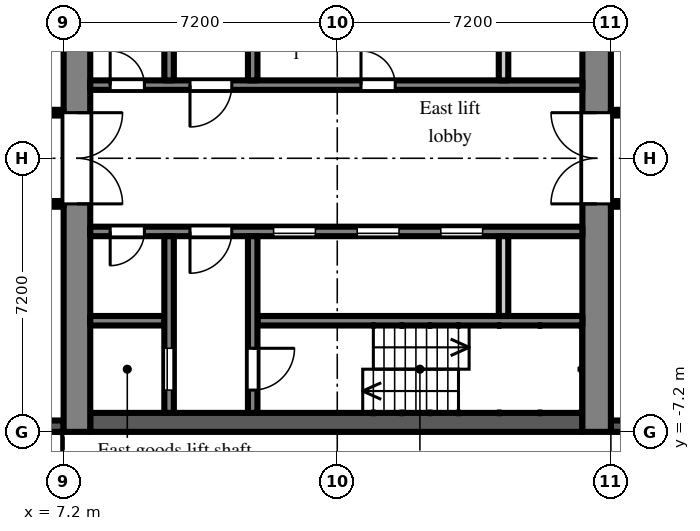
"""IFC4 building model, lengths in metres.
Left out: names, types, materials, properties, quantities, classifications, styles, units other than length and angle.
Written with IfcOpenShell. Run it as: python <this file> out.ifc"""

import sys

from ifc_helpers import new_model, si_unit, direction, frame, frame_2d, origin, place, context, subcontext, project, spatial, rectangle, extrude, element, fill, save


model = new_model("IFC4")
c1 = context("Model", 3, precision=1e-05, world=origin(), true_north=direction((0.0, 1.0)))
c2 = subcontext(c1, "Body", "Model", "MODEL_VIEW")
j1 = project(units=[si_unit("LENGTHUNIT", "METRE"), si_unit("PLANEANGLEUNIT", "RADIAN")], contexts=[c1])
p1 = place(None, origin())
s1 = spatial("IfcSite", under=j1, at=p1, CompositionType="ELEMENT")
p2 = place(p1, origin())
s2 = spatial("IfcBuilding", under=s1, at=p2, CompositionType="ELEMENT")
p3 = place(p2, frame((0.0, 0.0, 93.9)))
s3 = spatial("IfcBuildingStorey", under=s2, at=p3, CompositionType="ELEMENT", Elevation=93.9)
p4 = place(p3, frame((21.6, -7.05, 0.0), z_axis=(0.0, 0.0, 1.0), x_axis=(1.0, 0.0, 0.0)))
e1 = element("IfcWall", 1, at=p4, inside=s3, PredefinedType="SOLIDWALL", context=c2, shape_type="SweptSolid", body=[
    extrude(rectangle(XDim=2.7, YDim=0.3, at=frame_2d((1.35, 0.0))), origin(), (0.0, 0.0, 1.0), 2.1),
])
p5 = place(p3, frame((4.2, -7.05, 0.0), z_axis=(0.0, 0.0, 1.0), x_axis=(1.0, 0.0, 0.0)))
e2 = element("IfcWall", 2, at=p5, inside=s3, PredefinedType="SOLIDWALL", context=c2, shape_type="SweptSolid", body=[
    extrude(rectangle(XDim=3.0, YDim=0.3, at=frame_2d((1.5, 0.0))), origin(), (0.0, 0.0, 1.0), 2.1),
])
p6 = place(p3, frame((7.55, -7.2, 0.0), z_axis=(0.0, 0.0, 1.0), x_axis=(0.0, 1.0, 0.0)))
e3 = element("IfcWall", 3, at=p6, inside=s3, PredefinedType="SHEAR", context=c2, shape_type="SweptSolid", body=[
    extrude(rectangle(XDim=14.4, YDim=0.7, at=frame_2d((7.2, 0.0))), origin(), (0.0, 0.0, 1.0), 2.575),
])
p7 = place(p6, frame((6.0, 0.0, 0.0)))
e4 = element("IfcOpeningElement", 4, at=p7, cuts=e3, PredefinedType="OPENING", context=c2, shape_type="SweptSolid", body=[
    extrude(rectangle(XDim=2.4, YDim=2.2, at=frame_2d((1.2, 1.1))), frame((0.0, 0.36, 0.0), z_axis=(0.0, -1.0, 0.0), x_axis=(1.0, 0.0, 0.0)), (0.0, 0.0, 1.0), 0.72),
])
p8 = place(p3, frame((21.225, -7.2, 0.0), z_axis=(0.0, 0.0, 1.0), x_axis=(0.0, 1.0, 0.0)))
e5 = element("IfcWall", 5, at=p8, inside=s3, PredefinedType="SHEAR", context=c2, shape_type="SweptSolid", body=[
    extrude(rectangle(XDim=14.4, YDim=0.75, at=frame_2d((7.2, 0.0))), origin(), (0.0, 0.0, 1.0), 2.575),
])
p9 = place(p8, frame((6.0, 0.0, 0.0)))
e6 = element("IfcOpeningElement", 6, at=p9, cuts=e5, PredefinedType="OPENING", context=c2, shape_type="SweptSolid", body=[
    extrude(rectangle(XDim=2.4, YDim=2.2, at=frame_2d((1.2, 1.1))), frame((0.0, 0.385, 0.0), z_axis=(0.0, -1.0, 0.0), x_axis=(1.0, 0.0, 0.0)), (0.0, 0.0, 1.0), 0.77),
])
p10 = place(p3, frame((7.9, 1.925, 0.0), z_axis=(0.0, 0.0, 1.0), x_axis=(1.0, 0.0, 0.0)))
e7 = element("IfcWall", 7, at=p10, inside=s3, PredefinedType="SHEAR", context=c2, shape_type="SweptSolid", body=[
    extrude(rectangle(XDim=12.95, YDim=0.25, at=frame_2d((6.475, 0.0))), origin(), (0.0, 0.0, 1.0), 2.575),
])
p11 = place(p10, frame((0.525, 0.0, 0.0)))
e8 = element("IfcOpeningElement", 8, at=p11, cuts=e7, PredefinedType="OPENING", context=c2, shape_type="SweptSolid", body=[
    extrude(rectangle(XDim=0.9, YDim=2.1, at=frame_2d((0.45, 1.05))), frame((0.0, 0.135, 0.0), z_axis=(0.0, -1.0, 0.0), x_axis=(1.0, 0.0, 0.0)), (0.0, 0.0, 1.0), 0.27),
])
p12 = place(p10, frame((2.625, 0.0, 0.0)))
e9 = element("IfcOpeningElement", 9, at=p12, cuts=e7, PredefinedType="OPENING", context=c2, shape_type="SweptSolid", body=[
    extrude(rectangle(XDim=1.1, YDim=2.1, at=frame_2d((0.55, 1.05))), frame((0.0, 0.135, 0.0), z_axis=(0.0, -1.0, 0.0), x_axis=(1.0, 0.0, 0.0)), (0.0, 0.0, 1.0), 0.27),
])
p13 = place(p10, frame((7.125, 0.0, 0.0)))
e10 = element("IfcOpeningElement", 10, at=p13, cuts=e7, PredefinedType="OPENING", context=c2, shape_type="SweptSolid", body=[
    extrude(rectangle(XDim=0.9, YDim=2.1, at=frame_2d((0.45, 1.05))), frame((0.0, 0.135, 0.0), z_axis=(0.0, -1.0, 0.0), x_axis=(1.0, 0.0, 0.0)), (0.0, 0.0, 1.0), 0.27),
])
p14 = place(p3, frame((9.975, 2.05, 0.0), z_axis=(0.0, 0.0, 1.0), x_axis=(0.0, 1.0, 0.0)))
e11 = element("IfcWall", 11, at=p14, inside=s3, PredefinedType="SHEAR", context=c2, shape_type="SweptSolid", body=[
    extrude(rectangle(XDim=4.65, YDim=0.25, at=frame_2d((2.325, 0.0))), origin(), (0.0, 0.0, 1.0), 2.575),
])
p15 = place(p14, frame((2.95, 0.0, 0.0)))
e12 = element("IfcOpeningElement", 12, at=p15, cuts=e11, PredefinedType="OPENING", context=c2, shape_type="SweptSolid", body=[
    extrude(rectangle(XDim=1.1, YDim=2.1, at=frame_2d((0.55, 1.05))), frame((0.0, 0.135, 0.0), z_axis=(0.0, -1.0, 0.0), x_axis=(1.0, 0.0, 0.0)), (0.0, 0.0, 1.0), 0.27),
])
p16 = place(p3, frame((12.175, 2.05, 0.0), z_axis=(0.0, 0.0, 1.0), x_axis=(0.0, 1.0, 0.0)))
e13 = element("IfcWall", 13, at=p16, inside=s3, PredefinedType="SHEAR", context=c2, shape_type="SweptSolid", body=[
    extrude(rectangle(XDim=4.65, YDim=0.25, at=frame_2d((2.325, 0.0))), origin(), (0.0, 0.0, 1.0), 2.575),
])
p17 = place(p16, frame((2.95, 0.0, 0.0)))
e14 = element("IfcOpeningElement", 14, at=p17, cuts=e13, PredefinedType="OPENING", context=c2, shape_type="SweptSolid", body=[
    extrude(rectangle(XDim=1.1, YDim=2.1, at=frame_2d((0.55, 1.05))), frame((0.0, 0.135, 0.0), z_axis=(0.0, -1.0, 0.0), x_axis=(1.0, 0.0, 0.0)), (0.0, 0.0, 1.0), 0.27),
])
p18 = place(p3, frame((18.775, 2.05, 0.0), z_axis=(0.0, 0.0, 1.0), x_axis=(0.0, 1.0, 0.0)))
e15 = element("IfcWall", 15, at=p18, inside=s3, PredefinedType="PARTITIONING", context=c2, shape_type="SweptSolid", body=[
    extrude(rectangle(XDim=2.1, YDim=0.25, at=frame_2d((1.05, 0.0))), origin(), (0.0, 0.0, 1.0), 2.575),
])
p19 = place(p3, frame((7.9, -6.95, 0.0), z_axis=(0.0, 0.0, 1.0), x_axis=(1.0, 0.0, 0.0)))
e16 = element("IfcWall", 16, at=p19, inside=s3, PredefinedType="SHEAR", context=c2, shape_type="SweptSolid", body=[
    extrude(rectangle(XDim=12.95, YDim=0.5, at=frame_2d((6.475, 0.0))), origin(), (0.0, 0.0, 1.0), 2.575),
])
p20 = place(p3, frame((7.9, -1.925, 0.0), z_axis=(0.0, 0.0, 1.0), x_axis=(1.0, 0.0, 0.0)))
e17 = element("IfcWall", 17, at=p20, inside=s3, PredefinedType="SHEAR", context=c2, shape_type="SweptSolid", body=[
    extrude(rectangle(XDim=12.95, YDim=0.25, at=frame_2d((6.475, 0.0))), origin(), (0.0, 0.0, 1.0), 2.575),
])
p21 = place(p20, frame((4.825, 0.0, 0.0)))
e18 = element("IfcOpeningElement", 18, at=p21, cuts=e17, PredefinedType="OPENING", context=c2, shape_type="SweptSolid", body=[
    extrude(rectangle(XDim=1.1, YDim=2.1, at=frame_2d((0.55, 1.05))), frame((0.0, 0.135, 0.0), z_axis=(0.0, -1.0, 0.0), x_axis=(1.0, 0.0, 0.0)), (0.0, 0.0, 1.0), 0.27),
])
p22 = place(p20, frame((7.025, 0.0, 0.0)))
e19 = element("IfcOpeningElement", 19, at=p22, cuts=e17, PredefinedType="OPENING", context=c2, shape_type="SweptSolid", body=[
    extrude(rectangle(XDim=1.1, YDim=2.1, at=frame_2d((0.55, 1.05))), frame((0.0, 0.135, 0.0), z_axis=(0.0, -1.0, 0.0), x_axis=(1.0, 0.0, 0.0)), (0.0, 0.0, 1.0), 0.27),
])
p23 = place(p20, frame((9.225, 0.0, 0.0)))
e20 = element("IfcOpeningElement", 20, at=p23, cuts=e17, PredefinedType="OPENING", context=c2, shape_type="SweptSolid", body=[
    extrude(rectangle(XDim=1.1, YDim=2.1, at=frame_2d((0.55, 1.05))), frame((0.0, 0.135, 0.0), z_axis=(0.0, -1.0, 0.0), x_axis=(1.0, 0.0, 0.0)), (0.0, 0.0, 1.0), 0.27),
])
p24 = place(p20, frame((0.525, 0.0, 0.0)))
e21 = element("IfcOpeningElement", 21, at=p24, cuts=e17, PredefinedType="OPENING", context=c2, shape_type="SweptSolid", body=[
    extrude(rectangle(XDim=0.9, YDim=2.1, at=frame_2d((0.45, 1.05))), frame((0.0, 0.135, 0.0), z_axis=(0.0, -1.0, 0.0), x_axis=(1.0, 0.0, 0.0)), (0.0, 0.0, 1.0), 0.27),
])
p25 = place(p20, frame((2.625, 0.0, 0.0)))
e22 = element("IfcOpeningElement", 22, at=p25, cuts=e17, PredefinedType="OPENING", context=c2, shape_type="SweptSolid", body=[
    extrude(rectangle(XDim=1.1, YDim=2.1, at=frame_2d((0.55, 1.05))), frame((0.0, 0.135, 0.0), z_axis=(0.0, -1.0, 0.0), x_axis=(1.0, 0.0, 0.0)), (0.0, 0.0, 1.0), 0.27),
])
p26 = place(p3, frame((7.9, -4.275, 0.0), z_axis=(0.0, 0.0, 1.0), x_axis=(1.0, 0.0, 0.0)))
e23 = element("IfcWall", 23, at=p26, inside=s3, PredefinedType="SHEAR", context=c2, shape_type="SweptSolid", body=[
    extrude(rectangle(XDim=1.95, YDim=0.25, at=frame_2d((0.975, 0.0))), origin(), (0.0, 0.0, 1.0), 2.575),
])
p27 = place(p3, frame((12.3, -4.275, 0.0), z_axis=(0.0, 0.0, 1.0), x_axis=(1.0, 0.0, 0.0)))
e24 = element("IfcWall", 24, at=p27, inside=s3, PredefinedType="SHEAR", context=c2, shape_type="SweptSolid", body=[
    extrude(rectangle(XDim=8.55, YDim=0.25, at=frame_2d((4.275, 0.0))), origin(), (0.0, 0.0, 1.0), 2.575),
])
p28 = place(p3, frame((9.975, -2.05, 0.0), z_axis=(0.0, 0.0, 1.0), x_axis=(0.0, -1.0, 0.0)))
e25 = element("IfcWall", 25, at=p28, inside=s3, PredefinedType="SHEAR", context=c2, shape_type="SweptSolid", body=[
    extrude(rectangle(XDim=4.65, YDim=0.25, at=frame_2d((2.325, 0.0))), origin(), (0.0, 0.0, 1.0), 2.575),
])
p29 = place(p28, frame((2.95, 0.0, 0.0)))
e26 = element("IfcOpeningElement", 26, at=p29, cuts=e25, PredefinedType="OPENING", context=c2, shape_type="SweptSolid", body=[
    extrude(rectangle(XDim=1.1, YDim=2.1, at=frame_2d((0.55, 1.05))), frame((0.0, 0.135, 0.0), z_axis=(0.0, -1.0, 0.0), x_axis=(1.0, 0.0, 0.0)), (0.0, 0.0, 1.0), 0.27),
])
p30 = place(p3, frame((12.175, -2.05, 0.0), z_axis=(0.0, 0.0, 1.0), x_axis=(0.0, -1.0, 0.0)))
e27 = element("IfcWall", 27, at=p30, inside=s3, PredefinedType="SHEAR", context=c2, shape_type="SweptSolid", body=[
    extrude(rectangle(XDim=4.65, YDim=0.25, at=frame_2d((2.325, 0.0))), origin(), (0.0, 0.0, 1.0), 2.575),
])
p31 = place(p30, frame((2.95, 0.0, 0.0)))
e28 = element("IfcOpeningElement", 28, at=p31, cuts=e27, PredefinedType="OPENING", context=c2, shape_type="SweptSolid", body=[
    extrude(rectangle(XDim=1.1, YDim=2.1, at=frame_2d((0.55, 1.05))), frame((0.0, 0.135, 0.0), z_axis=(0.0, -1.0, 0.0), x_axis=(1.0, 0.0, 0.0)), (0.0, 0.0, 1.0), 0.27),
])
p32 = place(p3, frame((18.775, -2.05, 0.0), z_axis=(0.0, 0.0, 1.0), x_axis=(0.0, -1.0, 0.0)))
e29 = element("IfcWall", 29, at=p32, inside=s3, PredefinedType="PARTITIONING", context=c2, shape_type="SweptSolid", body=[
    extrude(rectangle(XDim=2.1, YDim=0.25, at=frame_2d((1.05, 0.0))), origin(), (0.0, 0.0, 1.0), 2.575),
])
p33 = place(p3, frame((1.275, -1.2, 0.0), z_axis=(0.0, 0.0, 1.0), x_axis=(1.0, 0.0, 0.0)))
e30 = element("IfcWall", 30, at=p33, inside=s3, PredefinedType="PARTITIONING", context=c2, shape_type="SweptSolid", body=[
    extrude(rectangle(XDim=5.925, YDim=0.15, at=frame_2d((2.962, 0.0))), origin(), (0.0, 0.0, 1.0), 2.575),
])
p34 = place(p33, frame((3.075, 0.0, 0.0)))
e31 = element("IfcOpeningElement", 31, at=p34, cuts=e30, PredefinedType="OPENING", context=c2, shape_type="SweptSolid", body=[
    extrude(rectangle(XDim=0.9, YDim=2.1, at=frame_2d((0.45, 1.05))), frame((0.0, 0.085, 0.0), z_axis=(0.0, -1.0, 0.0), x_axis=(1.0, 0.0, 0.0)), (0.0, 0.0, 1.0), 0.17),
])
p35 = place(p3, frame((1.275, 1.2, 0.0), z_axis=(0.0, 0.0, 1.0), x_axis=(1.0, 0.0, 0.0)))
e32 = element("IfcWall", 32, at=p35, inside=s3, PredefinedType="PARTITIONING", context=c2, shape_type="SweptSolid", body=[
    extrude(rectangle(XDim=5.925, YDim=0.15, at=frame_2d((2.962, 0.0))), origin(), (0.0, 0.0, 1.0), 2.575),
])
p36 = place(p35, frame((2.475, 0.0, 0.0)))
e33 = element("IfcOpeningElement", 33, at=p36, cuts=e32, PredefinedType="OPENING", context=c2, shape_type="SweptSolid", body=[
    extrude(rectangle(XDim=0.9, YDim=2.1, at=frame_2d((0.45, 1.05))), frame((0.0, 0.085, 0.0), z_axis=(0.0, -1.0, 0.0), x_axis=(1.0, 0.0, 0.0)), (0.0, 0.0, 1.0), 0.17),
])
p37 = place(p35, frame((4.475, 0.0, 0.0)))
e34 = element("IfcOpeningElement", 34, at=p37, cuts=e32, PredefinedType="OPENING", context=c2, shape_type="SweptSolid", body=[
    extrude(rectangle(XDim=0.9, YDim=2.1, at=frame_2d((0.45, 1.05))), frame((0.0, 0.085, 0.0), z_axis=(0.0, -1.0, 0.0), x_axis=(1.0, 0.0, 0.0)), (0.0, 0.0, 1.0), 0.17),
])
p38 = place(p3, frame((21.6, -1.2, 0.0), z_axis=(0.0, 0.0, 1.0), x_axis=(1.0, 0.0, 0.0)))
e35 = element("IfcWall", 35, at=p38, inside=s3, PredefinedType="PARTITIONING", context=c2, shape_type="SweptSolid", body=[
    extrude(rectangle(XDim=14.9, YDim=0.15, at=frame_2d((7.45, 0.0))), origin(), (0.0, 0.0, 1.0), 2.575),
])
p39 = place(p38, frame((2.7, 0.0, 0.0)))
e36 = element("IfcOpeningElement", 36, at=p39, cuts=e35, PredefinedType="OPENING", context=c2, shape_type="SweptSolid", body=[
    extrude(rectangle(XDim=1.8, YDim=2.1, at=frame_2d((0.9, 1.05))), frame((0.0, 0.085, 0.0), z_axis=(0.0, -1.0, 0.0), x_axis=(1.0, 0.0, 0.0)), (0.0, 0.0, 1.0), 0.17),
])
p40 = place(p38, frame((9.2, 0.0, 0.0)))
e37 = element("IfcOpeningElement", 37, at=p40, cuts=e35, PredefinedType="OPENING", context=c2, shape_type="SweptSolid", body=[
    extrude(rectangle(XDim=1.0, YDim=2.1, at=frame_2d((0.5, 1.05))), frame((0.0, 0.085, 0.0), z_axis=(0.0, -1.0, 0.0), x_axis=(1.0, 0.0, 0.0)), (0.0, 0.0, 1.0), 0.17),
])
p41 = place(p38, frame((11.95, 0.0, 0.0)))
e38 = element("IfcOpeningElement", 38, at=p41, cuts=e35, PredefinedType="OPENING", context=c2, shape_type="SweptSolid", body=[
    extrude(rectangle(XDim=1.8, YDim=2.1, at=frame_2d((0.9, 1.05))), frame((0.0, 0.085, 0.0), z_axis=(0.0, -1.0, 0.0), x_axis=(1.0, 0.0, 0.0)), (0.0, 0.0, 1.0), 0.17),
])
p42 = place(p3, frame((21.6, 1.2, 0.0), z_axis=(0.0, 0.0, 1.0), x_axis=(1.0, 0.0, 0.0)))
e39 = element("IfcWall", 39, at=p42, inside=s3, PredefinedType="PARTITIONING", context=c2, shape_type="SweptSolid", body=[
    extrude(rectangle(XDim=14.9, YDim=0.15, at=frame_2d((7.45, 0.0))), origin(), (0.0, 0.0, 1.0), 2.575),
])
p43 = place(p42, frame((6.0, 0.0, 0.0)))
e40 = element("IfcOpeningElement", 40, at=p43, cuts=e39, PredefinedType="OPENING", context=c2, shape_type="SweptSolid", body=[
    extrude(rectangle(XDim=1.0, YDim=2.1, at=frame_2d((0.5, 1.05))), frame((0.0, 0.085, 0.0), z_axis=(0.0, -1.0, 0.0), x_axis=(1.0, 0.0, 0.0)), (0.0, 0.0, 1.0), 0.17),
])
p44 = place(p42, frame((7.65, 0.0, 0.0)))
e41 = element("IfcOpeningElement", 41, at=p44, cuts=e39, PredefinedType="OPENING", context=c2, shape_type="SweptSolid", body=[
    extrude(rectangle(XDim=0.9, YDim=2.1, at=frame_2d((0.45, 1.05))), frame((0.0, 0.085, 0.0), z_axis=(0.0, -1.0, 0.0), x_axis=(1.0, 0.0, 0.0)), (0.0, 0.0, 1.0), 0.17),
])
p45 = place(p42, frame((9.45, 0.0, 0.0)))
e42 = element("IfcOpeningElement", 42, at=p45, cuts=e39, PredefinedType="OPENING", context=c2, shape_type="SweptSolid", body=[
    extrude(rectangle(XDim=0.9, YDim=2.1, at=frame_2d((0.45, 1.05))), frame((0.0, 0.085, 0.0), z_axis=(0.0, -1.0, 0.0), x_axis=(1.0, 0.0, 0.0)), (0.0, 0.0, 1.0), 0.17),
])
p46 = place(p42, frame((11.95, 0.0, 0.0)))
e43 = element("IfcOpeningElement", 43, at=p46, cuts=e39, PredefinedType="OPENING", context=c2, shape_type="SweptSolid", body=[
    extrude(rectangle(XDim=1.8, YDim=2.1, at=frame_2d((0.9, 1.05))), frame((0.0, 0.085, 0.0), z_axis=(0.0, -1.0, 0.0), x_axis=(1.0, 0.0, 0.0)), (0.0, 0.0, 1.0), 0.17),
])
p47 = place(p21, origin())
e44 = element("IfcDoor", 44, at=p47, inside=s3, OperationType="SLIDING_TO_LEFT", PredefinedType="DOOR", context=c2, shape_type="SweptSolid", body=[
    extrude(rectangle(XDim=1.1, YDim=2.1, at=frame_2d((0.55, 1.05))), frame((0.0, 0.025, 0.0), z_axis=(0.0, -1.0, 0.0), x_axis=(1.0, 0.0, 0.0)), (0.0, 0.0, 1.0), 0.05),
])
fill(e18, e44)
p48 = place(p22, origin())
e45 = element("IfcDoor", 45, at=p48, inside=s3, OperationType="SLIDING_TO_LEFT", PredefinedType="DOOR", context=c2, shape_type="SweptSolid", body=[
    extrude(rectangle(XDim=1.1, YDim=2.1, at=frame_2d((0.55, 1.05))), frame((0.0, 0.025, 0.0), z_axis=(0.0, -1.0, 0.0), x_axis=(1.0, 0.0, 0.0)), (0.0, 0.0, 1.0), 0.05),
])
fill(e19, e45)
p49 = place(p23, origin())
e46 = element("IfcDoor", 46, at=p49, inside=s3, OperationType="SLIDING_TO_LEFT", PredefinedType="DOOR", context=c2, shape_type="SweptSolid", body=[
    extrude(rectangle(XDim=1.1, YDim=2.1, at=frame_2d((0.55, 1.05))), frame((0.0, 0.025, 0.0), z_axis=(0.0, -1.0, 0.0), x_axis=(1.0, 0.0, 0.0)), (0.0, 0.0, 1.0), 0.05),
])
fill(e20, e46)
p50 = place(p29, origin())
e47 = element("IfcDoor", 47, at=p50, inside=s3, OperationType="SLIDING_TO_LEFT", PredefinedType="DOOR", context=c2, shape_type="SweptSolid", body=[
    extrude(rectangle(XDim=1.1, YDim=2.1, at=frame_2d((0.55, 1.05))), frame((0.0, 0.025, 0.0), z_axis=(0.0, -1.0, 0.0), x_axis=(1.0, 0.0, 0.0)), (0.0, 0.0, 1.0), 0.05),
])
fill(e26, e47)
p51 = place(p31, origin())
e48 = element("IfcDoor", 48, at=p51, inside=s3, OperationType="SINGLE_SWING_LEFT", PredefinedType="DOOR", context=c2, shape_type="SweptSolid", body=[
    extrude(rectangle(XDim=1.1, YDim=2.1, at=frame_2d((0.55, 1.05))), frame((0.0, 0.025, 0.0), z_axis=(0.0, -1.0, 0.0), x_axis=(1.0, 0.0, 0.0)), (0.0, 0.0, 1.0), 0.05),
])
fill(e28, e48)
p52 = place(p11, origin())
e49 = element("IfcDoor", 49, at=p52, inside=s3, OperationType="SINGLE_SWING_LEFT", PredefinedType="DOOR", context=c2, shape_type="SweptSolid", body=[
    extrude(rectangle(XDim=0.9, YDim=2.1, at=frame_2d((0.45, 1.05))), frame((0.0, 0.025, 0.0), z_axis=(0.0, -1.0, 0.0), x_axis=(1.0, 0.0, 0.0)), (0.0, 0.0, 1.0), 0.05),
])
fill(e8, e49)
p53 = place(p24, frame((0.9, 0.0, 0.0), z_axis=(0.0, 0.0, 1.0), x_axis=(-1.0, 0.0, 0.0)))
e50 = element("IfcDoor", 50, at=p53, inside=s3, OperationType="SINGLE_SWING_RIGHT", PredefinedType="DOOR", context=c2, shape_type="SweptSolid", body=[
    extrude(rectangle(XDim=0.9, YDim=2.1, at=frame_2d((0.45, 1.05))), frame((0.0, 0.025, 0.0), z_axis=(0.0, -1.0, 0.0), x_axis=(1.0, 0.0, 0.0)), (0.0, 0.0, 1.0), 0.05),
])
fill(e21, e50)
p54 = place(p12, frame((1.1, 0.0, 0.0), z_axis=(0.0, 0.0, 1.0), x_axis=(-1.0, 0.0, 0.0)))
e51 = element("IfcDoor", 51, at=p54, inside=s3, OperationType="SINGLE_SWING_RIGHT", PredefinedType="DOOR", context=c2, shape_type="SweptSolid", body=[
    extrude(rectangle(XDim=1.1, YDim=2.1, at=frame_2d((0.55, 1.05))), frame((0.0, 0.025, 0.0), z_axis=(0.0, -1.0, 0.0), x_axis=(1.0, 0.0, 0.0)), (0.0, 0.0, 1.0), 0.05),
])
fill(e9, e51)
p55 = place(p25, frame((1.1, 0.0, 0.0), z_axis=(0.0, 0.0, 1.0), x_axis=(-1.0, 0.0, 0.0)))
e52 = element("IfcDoor", 52, at=p55, inside=s3, OperationType="SINGLE_SWING_RIGHT", PredefinedType="DOOR", context=c2, shape_type="SweptSolid", body=[
    extrude(rectangle(XDim=1.1, YDim=2.1, at=frame_2d((0.55, 1.05))), frame((0.0, 0.025, 0.0), z_axis=(0.0, -1.0, 0.0), x_axis=(1.0, 0.0, 0.0)), (0.0, 0.0, 1.0), 0.05),
])
fill(e22, e52)
p56 = place(p7, frame((2.4, 0.0, 0.0), z_axis=(0.0, 0.0, 1.0), x_axis=(-1.0, 0.0, 0.0)))
e53 = element("IfcDoor", 53, at=p56, inside=s3, OperationType="DOUBLE_DOOR_DOUBLE_SWING", PredefinedType="DOOR", context=c2, shape_type="SweptSolid", body=[
    extrude(rectangle(XDim=2.4, YDim=2.2, at=frame_2d((1.2, 1.1))), frame((0.0, 0.025, 0.0), z_axis=(0.0, -1.0, 0.0), x_axis=(1.0, 0.0, 0.0)), (0.0, 0.0, 1.0), 0.05),
])
fill(e4, e53)
p57 = place(p9, origin())
e54 = element("IfcDoor", 54, at=p57, inside=s3, OperationType="DOUBLE_DOOR_DOUBLE_SWING", PredefinedType="DOOR", context=c2, shape_type="SweptSolid", body=[
    extrude(rectangle(XDim=2.4, YDim=2.2, at=frame_2d((1.2, 1.1))), frame((0.0, 0.025, 0.0), z_axis=(0.0, -1.0, 0.0), x_axis=(1.0, 0.0, 0.0)), (0.0, 0.0, 1.0), 0.05),
])
fill(e6, e54)
p58 = place(p13, origin())
e55 = element("IfcDoor", 55, at=p58, inside=s3, OperationType="SINGLE_SWING_LEFT", PredefinedType="DOOR", context=c2, shape_type="SweptSolid", body=[
    extrude(rectangle(XDim=0.9, YDim=2.1, at=frame_2d((0.45, 1.05))), frame((0.0, 0.025, 0.0), z_axis=(0.0, -1.0, 0.0), x_axis=(1.0, 0.0, 0.0)), (0.0, 0.0, 1.0), 0.05),
])
fill(e10, e55)
save(model, sys.argv[1])
